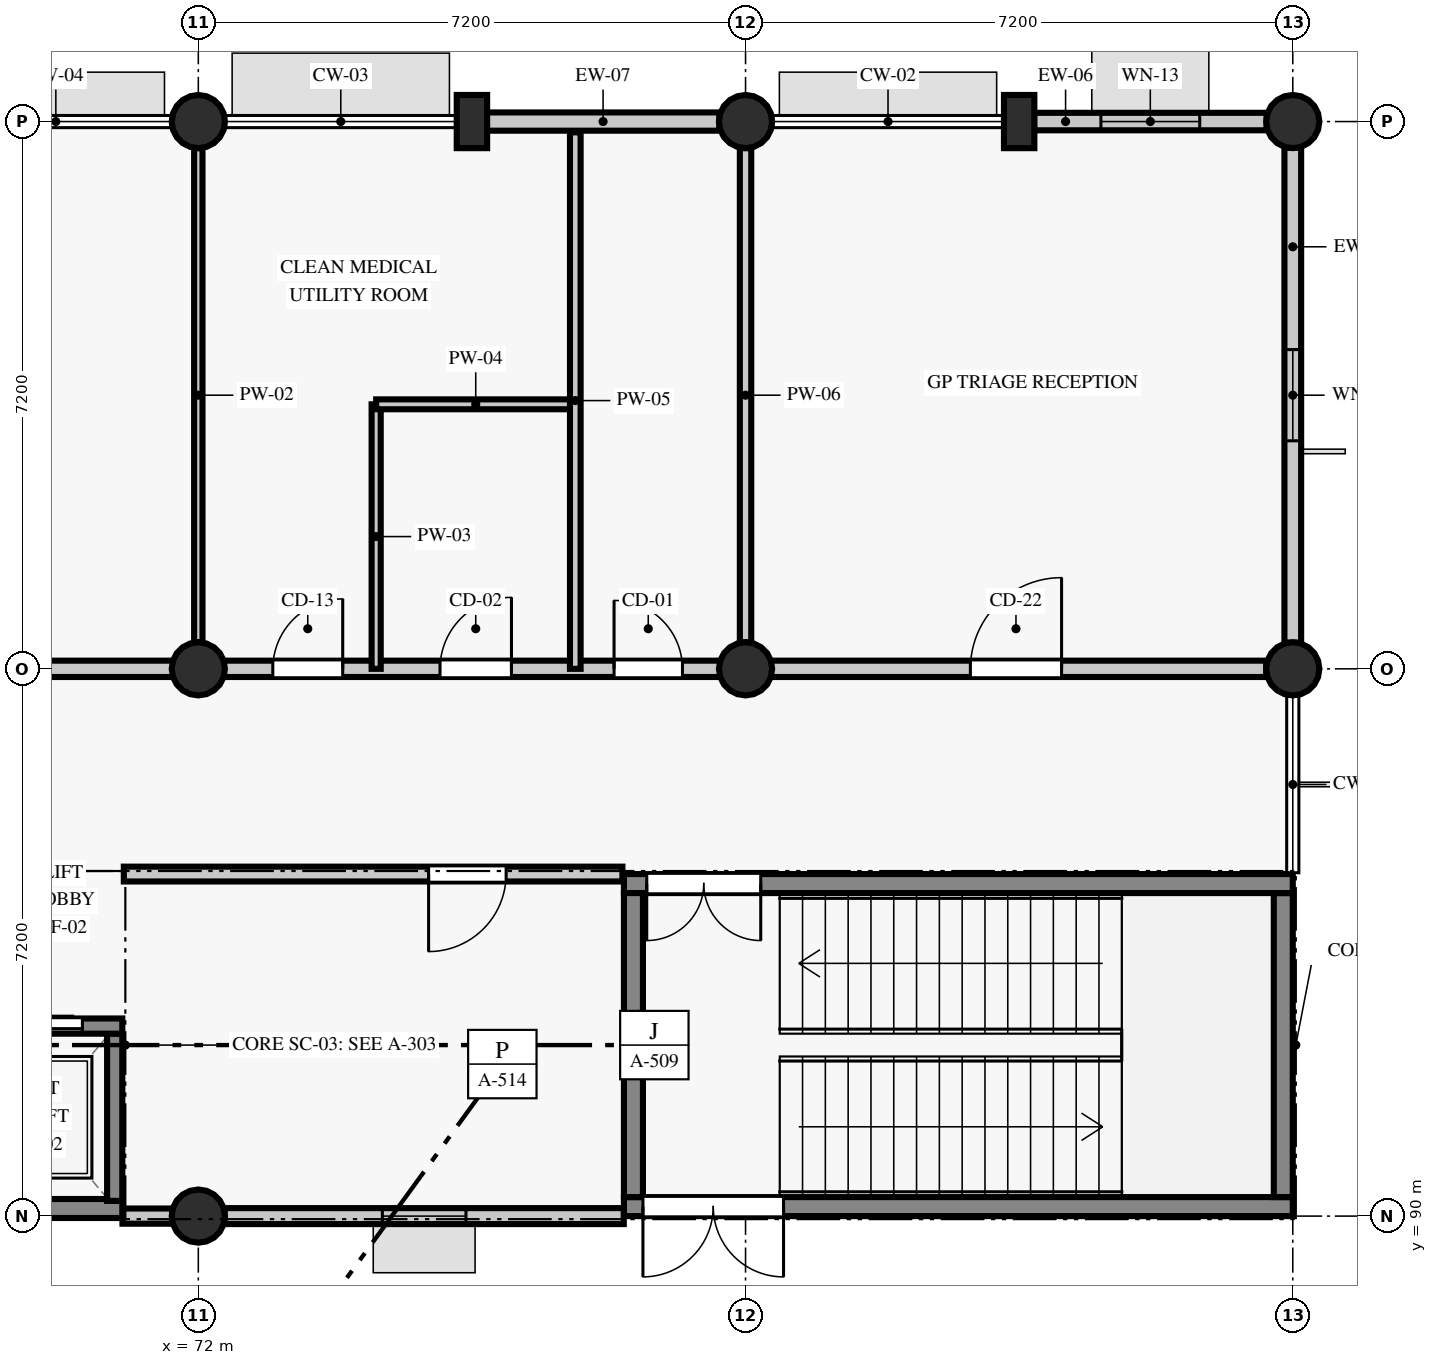
"""IFC4 building model, lengths in metres.
Left out: names, types, materials, properties, quantities, classifications, styles, units other than length and angle.
Written with IfcOpenShell. Run it as: python <this file> out.ifc"""

import sys

from ifc_helpers import new_model, si_unit, direction, frame, frame_2d, origin, origin_2d, place, context, subcontext, project, spatial, rectangle, circle, extrude, element, fill, save


model = new_model("IFC4")
c1 = context("Model", 3, precision=1e-05, world=origin(), true_north=direction((0.0, 1.0)))
c2 = subcontext(c1, "Body", "Model", "MODEL_VIEW")
j1 = project(units=[si_unit("LENGTHUNIT", "METRE"), si_unit("PLANEANGLEUNIT", "RADIAN")], contexts=[c1])
p1 = place(None, origin())
s1 = spatial("IfcSite", under=j1, at=p1, CompositionType="ELEMENT")
p2 = place(p1, origin())
s2 = spatial("IfcBuilding", under=s1, at=p2, CompositionType="ELEMENT")
p3 = place(p2, origin())
s3 = spatial("IfcBuildingStorey", under=s2, at=p3, CompositionType="ELEMENT", Elevation=0.0)
for number, where, z_axis, x_axis in (
    (1, (72.0, 90.0, 0.0), (0.0, 0.0, 1.0), (1.0, 0.0, 0.0)),
    (2, (72.0, 97.2, 0.0), (0.0, 0.0, 1.0), (1.0, 0.0, 0.0)),
    (3, (72.0, 104.4, 0.0), (0.0, 0.0, 1.0), (1.0, 0.0, 0.0)),
    (4, (79.2, 97.2, 0.0), (0.0, 0.0, 1.0), (1.0, 0.0, 0.0)),
    (5, (79.2, 104.4, 0.0), (0.0, 0.0, 1.0), (1.0, 0.0, 0.0)),
    (6, (86.4, 97.2, 0.0), (0.0, 0.0, 1.0), (1.0, 0.0, 0.0)),
    (7, (86.4, 104.4, 0.0), (0.0, 0.0, 1.0), (1.0, 0.0, 0.0)),
):
    element("IfcColumn", number, at=place(p3, frame(where, z_axis=z_axis, x_axis=x_axis)), inside=s3, PredefinedType="COLUMN", context=c2, shape_type="SweptSolid", body=[
        extrude(circle(Radius=0.35, at=origin_2d()), origin(), (0.0, 0.0, 1.0), 4.56),
    ])
for number, where, z_axis, x_axis in (
    (8, (75.6, 104.4, 0.0), (0.0, 0.0, 1.0), (1.0, 0.0, 0.0)),
    (9, (82.8, 104.4, 0.0), (0.0, 0.0, 1.0), (1.0, 0.0, 0.0)),
):
    element("IfcColumn", number, at=place(p3, frame(where, z_axis=z_axis, x_axis=x_axis)), inside=s3, PredefinedType="PILASTER", context=c2, shape_type="SweptSolid", body=[
        extrude(rectangle(XDim=0.4, YDim=0.7, at=origin_2d()), origin(), (0.0, 0.0, 1.0), 4.56),
    ])
p4 = place(p3, frame((71.002, 90.0, 0.0), z_axis=(0.0, 0.0, 1.0), x_axis=(1.0, 0.0, 0.0)))
e10 = element("IfcWall", 10, at=p4, inside=s3, PredefinedType="STANDARD", context=c2, shape_type="SweptSolid", body=[
    extrude(rectangle(XDim=0.653, YDim=0.2, at=frame_2d((0.327, 0.0))), origin(), (0.0, 0.0, 1.0), 4.56),
])
p5 = place(p3, frame((72.345, 90.0, 0.0), z_axis=(0.0, 0.0, 1.0), x_axis=(1.0, 0.0, 0.0)))
e11 = element("IfcWall", 11, at=p5, inside=s3, PredefinedType="STANDARD", context=c2, shape_type="SweptSolid", body=[
    extrude(rectangle(XDim=5.253, YDim=0.21, at=frame_2d((2.626, 0.0))), origin(), (0.0, 0.0, 1.0), 4.56),
])
p6 = place(p5, frame((2.076, 0.0, 0.9)))
e12 = element("IfcOpeningElement", 12, at=p6, cuts=e11, PredefinedType="OPENING", context=c2, shape_type="SweptSolid", body=[
    extrude(rectangle(XDim=1.1, YDim=1.42, at=frame_2d((0.55, 0.71))), frame((0.0, 0.115, 0.0), z_axis=(0.0, -1.0, 0.0), x_axis=(1.0, 0.0, 0.0)), (0.0, 0.0, 1.0), 0.23),
])
p7 = place(p3, frame((86.4, 97.545, 0.0), z_axis=(0.0, 0.0, 1.0), x_axis=(0.0, 1.0, 0.0)))
e13 = element("IfcWall", 13, at=p7, inside=s3, PredefinedType="STANDARD", context=c2, shape_type="SweptSolid", body=[
    extrude(rectangle(XDim=6.51, YDim=0.22, at=frame_2d((3.255, 0.0))), origin(), (0.0, 0.0, 1.0), 3.91),
])
p8 = place(p7, frame((2.655, 0.0, 0.9)))
e14 = element("IfcOpeningElement", 14, at=p8, cuts=e13, PredefinedType="OPENING", context=c2, shape_type="SweptSolid", body=[
    extrude(rectangle(XDim=1.2, YDim=1.42, at=frame_2d((0.6, 0.71))), frame((0.0, 0.12, 0.0), z_axis=(0.0, -1.0, 0.0), x_axis=(1.0, 0.0, 0.0)), (0.0, 0.0, 1.0), 0.24),
])
p9 = place(p3, frame((86.055, 104.4, 0.0), z_axis=(0.0, 0.0, 1.0), x_axis=(-1.0, 0.0, 0.0)))
e15 = element("IfcWall", 15, at=p9, inside=s3, PredefinedType="STANDARD", context=c2, shape_type="SweptSolid", body=[
    extrude(rectangle(XDim=3.059, YDim=0.23, at=frame_2d((1.529, 0.0))), origin(), (0.0, 0.0, 1.0), 3.91),
])
p10 = place(p9, frame((0.879, 0.0, 0.9)))
e16 = element("IfcOpeningElement", 16, at=p10, cuts=e15, PredefinedType="OPENING", context=c2, shape_type="SweptSolid", body=[
    extrude(rectangle(XDim=1.3, YDim=1.42, at=frame_2d((0.65, 0.71))), frame((0.0, 0.125, 0.0), z_axis=(0.0, -1.0, 0.0), x_axis=(1.0, 0.0, 0.0)), (0.0, 0.0, 1.0), 0.25),
])
p11 = place(p3, frame((78.855, 104.4, 0.0), z_axis=(0.0, 0.0, 1.0), x_axis=(-1.0, 0.0, 0.0)))
e17 = element("IfcWall", 17, at=p11, inside=s3, PredefinedType="STANDARD", context=c2, shape_type="SweptSolid", body=[
    extrude(rectangle(XDim=3.059, YDim=0.24, at=frame_2d((1.53, 0.0))), origin(), (0.0, 0.0, 1.0), 2.9),
])
p12 = place(p3, frame((77.6, 90.125, 0.0), z_axis=(0.0, 0.0, 1.0), x_axis=(1.0, 0.0, 0.0)))
e18 = element("IfcWall", 18, at=p12, inside=s3, PredefinedType="SHEAR", context=c2, shape_type="SweptSolid", body=[
    extrude(rectangle(XDim=8.8, YDim=0.25, at=frame_2d((4.4, 0.0))), origin(), (0.0, 0.0, 1.0), 4.56),
])
p13 = place(p12, frame((0.25, 0.0, 0.0)))
e19 = element("IfcOpeningElement", 19, at=p13, cuts=e18, PredefinedType="OPENING", context=c2, shape_type="SweptSolid", body=[
    extrude(rectangle(XDim=1.85, YDim=2.2, at=frame_2d((0.925, 1.1))), frame((0.0, 0.135, 0.0), z_axis=(0.0, -1.0, 0.0), x_axis=(1.0, 0.0, 0.0)), (0.0, 0.0, 1.0), 0.27),
])
p14 = place(p3, frame((86.275, 90.25, 0.0), z_axis=(0.0, 0.0, 1.0), x_axis=(0.0, 1.0, 0.0)))
e20 = element("IfcWall", 20, at=p14, inside=s3, PredefinedType="SHEAR", context=c2, shape_type="SweptSolid", body=[
    extrude(rectangle(XDim=4.0, YDim=0.25, at=frame_2d((2.0, 0.0))), origin(), (0.0, 0.0, 1.0), 4.56),
])
p15 = place(p3, frame((86.4, 94.375, 0.0), z_axis=(0.0, 0.0, 1.0), x_axis=(-1.0, 0.0, 0.0)))
e21 = element("IfcWall", 21, at=p15, inside=s3, PredefinedType="SHEAR", context=c2, shape_type="SweptSolid", body=[
    extrude(rectangle(XDim=8.8, YDim=0.25, at=frame_2d((4.4, 0.0))), origin(), (0.0, 0.0, 1.0), 4.56),
])
p16 = place(p15, frame((7.0, 0.0, 0.0)))
e22 = element("IfcOpeningElement", 22, at=p16, cuts=e21, PredefinedType="OPENING", context=c2, shape_type="SweptSolid", body=[
    extrude(rectangle(XDim=1.5, YDim=2.15, at=frame_2d((0.75, 1.075))), frame((0.0, 0.135, 0.0), z_axis=(0.0, -1.0, 0.0), x_axis=(1.0, 0.0, 0.0)), (0.0, 0.0, 1.0), 0.27),
])
p17 = place(p3, frame((77.725, 94.25, 0.0), z_axis=(0.0, 0.0, 1.0), x_axis=(0.0, -1.0, 0.0)))
e23 = element("IfcWall", 23, at=p17, inside=s3, PredefinedType="SHEAR", context=c2, shape_type="SweptSolid", body=[
    extrude(rectangle(XDim=4.0, YDim=0.25, at=frame_2d((2.0, 0.0))), origin(), (0.0, 0.0, 1.0), 4.56),
])
p18 = place(p3, frame((68.8, 90.1, 0.0), z_axis=(0.0, 0.0, 1.0), x_axis=(1.0, 0.0, 0.0)))
e24 = element("IfcWall", 24, at=p18, inside=s3, PredefinedType="SHEAR", context=c2, shape_type="SweptSolid", body=[
    extrude(rectangle(XDim=2.2, YDim=0.25, at=frame_2d((1.1, 0.0))), origin(), (0.0, 0.0, 1.0), 4.56),
])
p19 = place(p3, frame((70.9, 90.2, 0.0), z_axis=(0.0, 0.0, 1.0), x_axis=(0.0, 1.0, 0.0)))
e25 = element("IfcWall", 25, at=p19, inside=s3, PredefinedType="SHEAR", context=c2, shape_type="SweptSolid", body=[
    extrude(rectangle(XDim=2.2, YDim=0.2, at=frame_2d((1.1, 0.0))), origin(), (0.0, 0.0, 1.0), 4.56),
])
p20 = place(p3, frame((71.0, 92.5, 0.0), z_axis=(0.0, 0.0, 1.0), x_axis=(-1.0, 0.0, 0.0)))
e26 = element("IfcWall", 26, at=p20, inside=s3, PredefinedType="SHEAR", context=c2, shape_type="SweptSolid", body=[
    extrude(rectangle(XDim=2.2, YDim=0.2, at=frame_2d((1.1, 0.0))), origin(), (0.0, 0.0, 1.0), 4.56),
])
p21 = place(p20, frame((0.525, 0.0, 0.0)))
e27 = element("IfcOpeningElement", 27, at=p21, cuts=e26, PredefinedType="OPENING", context=c2, shape_type="SweptSolid", body=[
    extrude(rectangle(XDim=1.15, YDim=2.15, at=frame_2d((0.575, 1.075))), frame((0.0, 0.11, 0.0), z_axis=(0.0, -1.0, 0.0), x_axis=(1.0, 0.0, 0.0)), (0.0, 0.0, 1.0), 0.22),
])
p22 = place(p3, frame((50.75, 97.2, 0.0), z_axis=(0.0, 0.0, 1.0), x_axis=(1.0, 0.0, 0.0)))
e28 = element("IfcWall", 28, at=p22, inside=s3, PredefinedType="PARTITIONING", context=c2, shape_type="SweptSolid", body=[
    extrude(rectangle(XDim=35.3, YDim=0.215, at=frame_2d((17.65, 0.0))), origin(), (0.0, 0.0, 1.0), 3.81),
])
p23 = place(p22, frame((2.438, 0.0, 0.0)))
e29 = element("IfcOpeningElement", 29, at=p23, cuts=e28, PredefinedType="OPENING", context=c2, shape_type="SweptSolid", body=[
    extrude(rectangle(XDim=1.03, YDim=2.18, at=frame_2d((0.515, 1.09))), frame((0.0, 0.117, 0.0), z_axis=(0.0, -1.0, 0.0), x_axis=(1.0, 0.0, 0.0)), (0.0, 0.0, 1.0), 0.235),
])
p24 = place(p22, frame((4.118, 0.0, 1.05)))
e30 = element("IfcOpeningElement", 30, at=p24, cuts=e28, PredefinedType="OPENING", context=c2, shape_type="SweptSolid", body=[
    extrude(rectangle(XDim=1.5, YDim=1.1, at=frame_2d((0.75, 0.55))), frame((0.0, 0.117, 0.0), z_axis=(0.0, -1.0, 0.0), x_axis=(1.0, 0.0, 0.0)), (0.0, 0.0, 1.0), 0.235),
])
p25 = place(p22, frame((8.157, 0.0, 0.0)))
e31 = element("IfcOpeningElement", 31, at=p25, cuts=e28, PredefinedType="OPENING", context=c2, shape_type="SweptSolid", body=[
    extrude(rectangle(XDim=1.08, YDim=2.18, at=frame_2d((0.54, 1.09))), frame((0.0, 0.117, 0.0), z_axis=(0.0, -1.0, 0.0), x_axis=(1.0, 0.0, 0.0)), (0.0, 0.0, 1.0), 0.235),
])
p26 = place(p22, frame((9.837, 0.0, 0.0)))
e32 = element("IfcOpeningElement", 32, at=p26, cuts=e28, PredefinedType="OPENING", context=c2, shape_type="SweptSolid", body=[
    extrude(rectangle(XDim=1.13, YDim=2.18, at=frame_2d((0.565, 1.09))), frame((0.0, 0.117, 0.0), z_axis=(0.0, -1.0, 0.0), x_axis=(1.0, 0.0, 0.0)), (0.0, 0.0, 1.0), 0.235),
])
p27 = place(p22, frame((11.617, 0.0, 1.05)))
e33 = element("IfcOpeningElement", 33, at=p27, cuts=e28, PredefinedType="OPENING", context=c2, shape_type="SweptSolid", body=[
    extrude(rectangle(XDim=1.2, YDim=1.1, at=frame_2d((0.6, 0.55))), frame((0.0, 0.117, 0.0), z_axis=(0.0, -1.0, 0.0), x_axis=(1.0, 0.0, 0.0)), (0.0, 0.0, 1.0), 0.235),
])
p28 = place(p22, frame((16.952, 0.0, 0.0)))
e34 = element("IfcOpeningElement", 34, at=p28, cuts=e28, PredefinedType="OPENING", context=c2, shape_type="SweptSolid", body=[
    extrude(rectangle(XDim=1.18, YDim=2.18, at=frame_2d((0.59, 1.09))), frame((0.0, 0.117, 0.0), z_axis=(0.0, -1.0, 0.0), x_axis=(1.0, 0.0, 0.0)), (0.0, 0.0, 1.0), 0.235),
])
p29 = place(p22, frame((22.23, 0.0, 0.0)))
e35 = element("IfcOpeningElement", 35, at=p29, cuts=e28, PredefinedType="OPENING", context=c2, shape_type="SweptSolid", body=[
    extrude(rectangle(XDim=0.92, YDim=2.18, at=frame_2d((0.46, 1.09))), frame((0.0, 0.117, 0.0), z_axis=(0.0, -1.0, 0.0), x_axis=(1.0, 0.0, 0.0)), (0.0, 0.0, 1.0), 0.235),
])
p30 = place(p22, frame((24.43, 0.0, 0.0)))
e36 = element("IfcOpeningElement", 36, at=p30, cuts=e28, PredefinedType="OPENING", context=c2, shape_type="SweptSolid", body=[
    extrude(rectangle(XDim=0.94, YDim=2.08, at=frame_2d((0.47, 1.04))), frame((0.0, 0.117, 0.0), z_axis=(0.0, -1.0, 0.0), x_axis=(1.0, 0.0, 0.0)), (0.0, 0.0, 1.0), 0.235),
])
p31 = place(p22, frame((26.72, 0.0, 0.0)))
e37 = element("IfcOpeningElement", 37, at=p31, cuts=e28, PredefinedType="OPENING", context=c2, shape_type="SweptSolid", body=[
    extrude(rectangle(XDim=0.9, YDim=2.08, at=frame_2d((0.45, 1.04))), frame((0.0, 0.117, 0.0), z_axis=(0.0, -1.0, 0.0), x_axis=(1.0, 0.0, 0.0)), (0.0, 0.0, 1.0), 0.235),
])
p32 = place(p22, frame((31.408, 0.0, 0.0)))
e38 = element("IfcOpeningElement", 38, at=p32, cuts=e28, PredefinedType="OPENING", context=c2, shape_type="SweptSolid", body=[
    extrude(rectangle(XDim=1.2, YDim=2.23, at=frame_2d((0.6, 1.115))), frame((0.0, 0.117, 0.0), z_axis=(0.0, -1.0, 0.0), x_axis=(1.0, 0.0, 0.0)), (0.0, 0.0, 1.0), 0.235),
])
p33 = place(p3, frame((72.0, 97.55, 0.0), z_axis=(0.0, 0.0, 1.0), x_axis=(0.0, 1.0, 0.0)))
e39 = element("IfcWall", 39, at=p33, inside=s3, PredefinedType="PARTITIONING", context=c2, shape_type="SweptSolid", body=[
    extrude(rectangle(XDim=6.5, YDim=0.11, at=frame_2d((3.25, 0.0))), origin(), (0.0, 0.0, 1.0), 4.01),
])
p34 = place(p3, frame((74.34, 97.2, 0.0), z_axis=(0.0, 0.0, 1.0), x_axis=(0.0, 1.0, 0.0)))
e40 = element("IfcWall", 40, at=p34, inside=s3, PredefinedType="PARTITIONING", context=c2, shape_type="SweptSolid", body=[
    extrude(rectangle(XDim=3.48, YDim=0.12, at=frame_2d((1.74, 0.0))), origin(), (0.0, 0.0, 1.0), 3.81),
])
p35 = place(p3, frame((74.34, 100.68, 0.0), z_axis=(0.0, 0.0, 1.0), x_axis=(1.0, 0.0, 0.0)))
e41 = element("IfcWall", 41, at=p35, inside=s3, PredefinedType="PARTITIONING", context=c2, shape_type="SweptSolid", body=[
    extrude(rectangle(XDim=2.62, YDim=0.13, at=frame_2d((1.31, 0.0))), origin(), (0.0, 0.0, 1.0), 4.06),
])
p36 = place(p3, frame((76.96, 97.2, 0.0), z_axis=(0.0, 0.0, 1.0), x_axis=(0.0, 1.0, 0.0)))
e42 = element("IfcWall", 42, at=p36, inside=s3, PredefinedType="PARTITIONING", context=c2, shape_type="SweptSolid", body=[
    extrude(rectangle(XDim=7.058, YDim=0.14, at=frame_2d((3.529, 0.0))), origin(), (0.0, 0.0, 1.0), 3.81),
])
p37 = place(p3, frame((79.2, 97.55, 0.0), z_axis=(0.0, 0.0, 1.0), x_axis=(0.0, 1.0, 0.0)))
e43 = element("IfcWall", 43, at=p37, inside=s3, PredefinedType="PARTITIONING", context=c2, shape_type="SweptSolid", body=[
    extrude(rectangle(XDim=6.5, YDim=0.15, at=frame_2d((3.25, 0.0))), origin(), (0.0, 0.0, 1.0), 4.01),
])
p38 = place(p3, frame((71.02, 94.5, 0.0), z_axis=(0.0, 0.0, 1.0), x_axis=(1.0, 0.0, 0.0)))
e44 = element("IfcWall", 44, at=p38, inside=s3, PredefinedType="PARTITIONING", context=c2, shape_type="SweptSolid", body=[
    extrude(rectangle(XDim=6.56, YDim=0.195, at=frame_2d((3.28, 0.0))), origin(), (0.0, 0.0, 1.0), 4.01),
])
p39 = place(p38, frame((4.01, 0.0, 0.0)))
e45 = element("IfcOpeningElement", 45, at=p39, cuts=e44, PredefinedType="OPENING", context=c2, shape_type="SweptSolid", body=[
    extrude(rectangle(XDim=1.02, YDim=2.08, at=frame_2d((0.51, 1.04))), frame((0.0, 0.107, 0.0), z_axis=(0.0, -1.0, 0.0), x_axis=(1.0, 0.0, 0.0)), (0.0, 0.0, 1.0), 0.215),
])
p40 = place(p6, origin())
e46 = element("IfcWindow", 46, at=p40, inside=s3, PartitioningType="SINGLE_PANEL", PredefinedType="WINDOW", context=c2, shape_type="SweptSolid", body=[
    extrude(rectangle(XDim=1.1, YDim=1.42, at=frame_2d((0.55, 0.71))), frame((0.0, 0.03, 0.0), z_axis=(0.0, -1.0, 0.0), x_axis=(1.0, 0.0, 0.0)), (0.0, 0.0, 1.0), 0.06),
])
fill(e12, e46)
p41 = place(p8, origin())
e47 = element("IfcWindow", 47, at=p41, inside=s3, PartitioningType="SINGLE_PANEL", PredefinedType="WINDOW", context=c2, shape_type="SweptSolid", body=[
    extrude(rectangle(XDim=1.2, YDim=1.42, at=frame_2d((0.6, 0.71))), frame((0.0, 0.03, 0.0), z_axis=(0.0, -1.0, 0.0), x_axis=(1.0, 0.0, 0.0)), (0.0, 0.0, 1.0), 0.06),
])
fill(e14, e47)
p42 = place(p10, origin())
e48 = element("IfcWindow", 48, at=p42, inside=s3, PartitioningType="SINGLE_PANEL", PredefinedType="WINDOW", context=c2, shape_type="SweptSolid", body=[
    extrude(rectangle(XDim=1.3, YDim=1.42, at=frame_2d((0.65, 0.71))), frame((0.0, 0.03, 0.0), z_axis=(0.0, -1.0, 0.0), x_axis=(1.0, 0.0, 0.0)), (0.0, 0.0, 1.0), 0.06),
])
fill(e16, e48)
p43 = place(p13, frame((1.85, 0.0, 0.0), z_axis=(0.0, 0.0, 1.0), x_axis=(-1.0, 0.0, 0.0)))
e49 = element("IfcDoor", 49, at=p43, inside=s3, OperationType="DOUBLE_DOOR_SINGLE_SWING", PredefinedType="DOOR", context=c2, shape_type="SweptSolid", body=[
    extrude(rectangle(XDim=1.85, YDim=2.2, at=frame_2d((0.925, 1.1))), frame((0.0, 0.025, 0.0), z_axis=(0.0, -1.0, 0.0), x_axis=(1.0, 0.0, 0.0)), (0.0, 0.0, 1.0), 0.05),
])
fill(e19, e49)
p44 = place(p16, origin())
e50 = element("IfcDoor", 50, at=p44, inside=s3, OperationType="DOUBLE_DOOR_SINGLE_SWING", PredefinedType="DOOR", context=c2, shape_type="SweptSolid", body=[
    extrude(rectangle(XDim=1.5, YDim=2.15, at=frame_2d((0.75, 1.075))), frame((0.0, 0.025, 0.0), z_axis=(0.0, -1.0, 0.0), x_axis=(1.0, 0.0, 0.0)), (0.0, 0.0, 1.0), 0.05),
])
fill(e22, e50)
p45 = place(p21, frame((1.15, 0.0, 0.0), z_axis=(0.0, 0.0, 1.0), x_axis=(-1.0, 0.0, 0.0)))
e51 = element("IfcDoor", 51, at=p45, inside=s3, OperationType="DOUBLE_DOOR_SLIDING", PredefinedType="DOOR", context=c2, shape_type="SweptSolid", body=[
    extrude(rectangle(XDim=1.15, YDim=2.15, at=frame_2d((0.575, 1.075))), frame((0.0, 0.025, 0.0), z_axis=(0.0, -1.0, 0.0), x_axis=(1.0, 0.0, 0.0)), (0.0, 0.0, 1.0), 0.05),
])
fill(e27, e51)
p46 = place(p29, origin())
e52 = element("IfcDoor", 52, at=p46, inside=s3, OperationType="SINGLE_SWING_RIGHT", PredefinedType="DOOR", context=c2, shape_type="SweptSolid", body=[
    extrude(rectangle(XDim=0.92, YDim=2.18, at=frame_2d((0.46, 1.09))), frame((0.0, 0.025, 0.0), z_axis=(0.0, -1.0, 0.0), x_axis=(1.0, 0.0, 0.0)), (0.0, 0.0, 1.0), 0.05),
])
fill(e35, e52)
p47 = place(p30, origin())
e53 = element("IfcDoor", 53, at=p47, inside=s3, OperationType="SINGLE_SWING_RIGHT", PredefinedType="DOOR", context=c2, shape_type="SweptSolid", body=[
    extrude(rectangle(XDim=0.94, YDim=2.08, at=frame_2d((0.47, 1.04))), frame((0.0, 0.025, 0.0), z_axis=(0.0, -1.0, 0.0), x_axis=(1.0, 0.0, 0.0)), (0.0, 0.0, 1.0), 0.05),
])
fill(e36, e53)
p48 = place(p31, origin())
e54 = element("IfcDoor", 54, at=p48, inside=s3, OperationType="SINGLE_SWING_LEFT", PredefinedType="DOOR", context=c2, shape_type="SweptSolid", body=[
    extrude(rectangle(XDim=0.9, YDim=2.08, at=frame_2d((0.45, 1.04))), frame((0.0, 0.025, 0.0), z_axis=(0.0, -1.0, 0.0), x_axis=(1.0, 0.0, 0.0)), (0.0, 0.0, 1.0), 0.05),
])
fill(e37, e54)
p49 = place(p32, origin())
e55 = element("IfcDoor", 55, at=p49, inside=s3, OperationType="SINGLE_SWING_RIGHT", PredefinedType="DOOR", context=c2, shape_type="SweptSolid", body=[
    extrude(rectangle(XDim=1.2, YDim=2.23, at=frame_2d((0.6, 1.115))), frame((0.0, 0.025, 0.0), z_axis=(0.0, -1.0, 0.0), x_axis=(1.0, 0.0, 0.0)), (0.0, 0.0, 1.0), 0.05),
])
fill(e38, e55)
p50 = place(p39, frame((1.02, 0.0, 0.0), z_axis=(0.0, 0.0, 1.0), x_axis=(-1.0, 0.0, 0.0)))
e56 = element("IfcDoor", 56, at=p50, inside=s3, OperationType="SINGLE_SWING_RIGHT", PredefinedType="DOOR", context=c2, shape_type="SweptSolid", body=[
    extrude(rectangle(XDim=1.02, YDim=2.08, at=frame_2d((0.51, 1.04))), frame((0.0, 0.025, 0.0), z_axis=(0.0, -1.0, 0.0), x_axis=(1.0, 0.0, 0.0)), (0.0, 0.0, 1.0), 0.05),
])
fill(e45, e56)
save(model, sys.argv[1])
